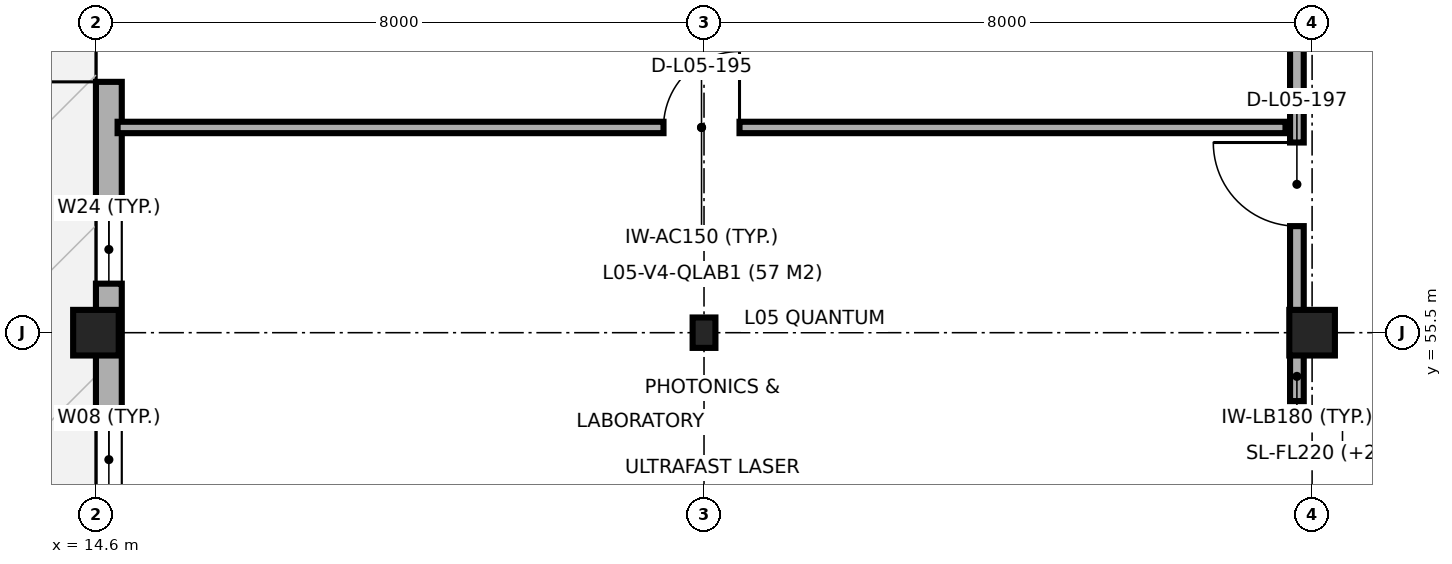
"""IFC4 building model, lengths in metres.
Left out: names, types, materials, properties, quantities, classifications, styles, units other than length and angle.
Written with IfcOpenShell. Run it as: python <this file> out.ifc"""

import sys

from ifc_helpers import new_model, si_unit, direction, frame, frame_2d, origin, origin_2d, place, context, subcontext, project, spatial, rectangle, i_section, extrude, element, fill, save


model = new_model("IFC4")
c1 = context("Model", 3, precision=1e-05, world=origin(), true_north=direction((0.0, 1.0)))
c2 = subcontext(c1, "Body", "Model", "MODEL_VIEW")
j1 = project(units=[si_unit("LENGTHUNIT", "METRE"), si_unit("PLANEANGLEUNIT", "RADIAN")], contexts=[c1])
p1 = place(None, origin())
s1 = spatial("IfcSite", under=j1, at=p1, CompositionType="ELEMENT")
p2 = place(p1, origin())
s2 = spatial("IfcBuilding", under=s1, at=p2, CompositionType="ELEMENT")
p3 = place(p2, frame((0.0, 0.0, 22.8)))
s3 = spatial("IfcBuildingStorey", under=s2, at=p3, CompositionType="ELEMENT", Elevation=22.8)
p4 = place(p3, frame((14.6, 55.5, 0.0), z_axis=(0.0, 0.0, 1.0), x_axis=(1.0, 0.0, 0.0)))
e1 = element("IfcColumn", 1, at=p4, inside=s3, PredefinedType="COLUMN", context=c2, shape_type="SweptSolid", body=[
    extrude(rectangle(XDim=0.6, YDim=0.6, at=origin_2d()), origin(), (0.0, 0.0, 1.0), 3.9),
])
p5 = place(p3, frame((22.6, 55.5, 0.0), z_axis=(0.0, 0.0, 1.0), x_axis=(1.0, 0.0, 0.0)))
e2 = element("IfcColumn", 2, at=p5, inside=s3, PredefinedType="COLUMN", context=c2, shape_type="SweptSolid", body=[
    extrude(i_section(OverallWidth=0.3, OverallDepth=0.4, WebThickness=0.013, FlangeThickness=0.024, FilletRadius=0.027, at=origin_2d()), origin(), (0.0, 0.0, 1.0), 3.9),
])
p6 = place(p3, frame((30.6, 55.5, 0.0), z_axis=(0.0, 0.0, 1.0), x_axis=(1.0, 0.0, 0.0)))
e3 = element("IfcColumn", 3, at=p6, inside=s3, PredefinedType="COLUMN", context=c2, shape_type="SweptSolid", body=[
    extrude(rectangle(XDim=0.6, YDim=0.6, at=origin_2d()), origin(), (0.0, 0.0, 1.0), 3.9),
])
p7 = place(p3, frame((14.77, 71.178, 0.0), z_axis=(0.0, 0.0, 1.0), x_axis=(0.0, -1.0, 0.0)))
e4 = element("IfcWall", 4, at=p7, inside=s3, PredefinedType="SOLIDWALL", context=c2, shape_type="SweptSolid", body=[
    extrude(rectangle(XDim=24.278, YDim=0.34, at=frame_2d((12.139, 0.0))), origin(), (0.0, 0.0, 1.0), 3.68),
])
p8 = place(p7, frame((10.978, 0.0, 0.0)))
e5 = element("IfcOpeningElement", 5, at=p8, cuts=e4, PredefinedType="OPENING", context=c2, shape_type="SweptSolid", body=[
    extrude(rectangle(XDim=1.4, YDim=2.2, at=frame_2d((0.7, 1.1))), frame((0.0, 0.18, 0.0), z_axis=(0.0, -1.0, 0.0), x_axis=(1.0, 0.0, 0.0)), (0.0, 0.0, 1.0), 0.36),
])
p9 = place(p7, frame((2.334, 0.0, 0.9)))
e6 = element("IfcOpeningElement", 6, at=p9, cuts=e4, PredefinedType="OPENING", context=c2, shape_type="SweptSolid", body=[
    extrude(rectangle(XDim=1.5, YDim=1.8, at=frame_2d((0.75, 0.9))), frame((0.0, 0.18, 0.0), z_axis=(0.0, -1.0, 0.0), x_axis=(1.0, 0.0, 0.0)), (0.0, 0.0, 1.0), 0.36),
])
p10 = place(p7, frame((8.298, 0.0, 0.9)))
e7 = element("IfcOpeningElement", 7, at=p10, cuts=e4, PredefinedType="OPENING", context=c2, shape_type="SweptSolid", body=[
    extrude(rectangle(XDim=0.9, YDim=1.8, at=frame_2d((0.45, 0.9))), frame((0.0, 0.18, 0.0), z_axis=(0.0, -1.0, 0.0), x_axis=(1.0, 0.0, 0.0)), (0.0, 0.0, 1.0), 0.36),
])
p11 = place(p7, frame((14.133, 0.0, 0.9)))
e8 = element("IfcOpeningElement", 8, at=p11, cuts=e4, PredefinedType="OPENING", context=c2, shape_type="SweptSolid", body=[
    extrude(rectangle(XDim=0.9, YDim=1.8, at=frame_2d((0.45, 0.9))), frame((0.0, 0.18, 0.0), z_axis=(0.0, -1.0, 0.0), x_axis=(1.0, 0.0, 0.0)), (0.0, 0.0, 1.0), 0.36),
])
p12 = place(p7, frame((16.748, 0.0, 0.9)))
e9 = element("IfcOpeningElement", 9, at=p12, cuts=e4, PredefinedType="OPENING", context=c2, shape_type="SweptSolid", body=[
    extrude(rectangle(XDim=1.2, YDim=2.1, at=frame_2d((0.6, 1.05))), frame((0.0, 0.18, 0.0), z_axis=(0.0, -1.0, 0.0), x_axis=(1.0, 0.0, 0.0)), (0.0, 0.0, 1.0), 0.36),
])
p13 = place(p7, frame((20.198, 0.0, 0.9)))
e10 = element("IfcOpeningElement", 10, at=p13, cuts=e4, PredefinedType="OPENING", context=c2, shape_type="SweptSolid", body=[
    extrude(rectangle(XDim=1.8, YDim=2.1, at=frame_2d((0.9, 1.05))), frame((0.0, 0.18, 0.0), z_axis=(0.0, -1.0, 0.0), x_axis=(1.0, 0.0, 0.0)), (0.0, 0.0, 1.0), 0.36),
])
p14 = place(p3, frame((14.885, 58.2, 0.0), z_axis=(0.0, 0.0, 1.0), x_axis=(1.0, 0.0, 0.0)))
e11 = element("IfcWall", 11, at=p14, inside=s3, PredefinedType="PARTITIONING", context=c2, shape_type="SweptSolid", body=[
    extrude(rectangle(XDim=15.365, YDim=0.15, at=frame_2d((7.683, 0.0))), origin(), (0.0, 0.0, 1.0), 3.68),
])
p15 = place(p14, frame((7.182, 0.0, 0.0)))
e12 = element("IfcOpeningElement", 12, at=p15, cuts=e11, PredefinedType="OPENING", context=c2, shape_type="SweptSolid", body=[
    extrude(rectangle(XDim=1.0, YDim=2.15, at=frame_2d((0.5, 1.075))), frame((0.0, 0.085, 0.0), z_axis=(0.0, -1.0, 0.0), x_axis=(1.0, 0.0, 0.0)), (0.0, 0.0, 1.0), 0.17),
])
p16 = place(p3, frame((30.4, 54.6, 0.0), z_axis=(0.0, 0.0, 1.0), x_axis=(0.0, 1.0, 0.0)))
e13 = element("IfcWall", 13, at=p16, inside=s3, PredefinedType="PARTITIONING", context=c2, shape_type="SweptSolid", body=[
    extrude(rectangle(XDim=0.65, YDim=0.18, at=frame_2d((0.325, 0.0))), origin(), (0.0, 0.0, 1.0), 3.28),
])
p17 = place(p3, frame((30.4, 55.75, 0.0), z_axis=(0.0, 0.0, 1.0), x_axis=(0.0, 1.0, 0.0)))
e14 = element("IfcWall", 14, at=p17, inside=s3, PredefinedType="PARTITIONING", context=c2, shape_type="SweptSolid", body=[
    extrude(rectangle(XDim=7.5, YDim=0.18, at=frame_2d((3.75, 0.0))), origin(), (0.0, 0.0, 1.0), 3.28),
])
p18 = place(p17, frame((1.152, 0.0, 0.0)))
e15 = element("IfcOpeningElement", 15, at=p18, cuts=e14, PredefinedType="OPENING", context=c2, shape_type="SweptSolid", body=[
    extrude(rectangle(XDim=1.1, YDim=2.15, at=frame_2d((0.55, 1.075))), frame((0.0, 0.1, 0.0), z_axis=(0.0, -1.0, 0.0), x_axis=(1.0, 0.0, 0.0)), (0.0, 0.0, 1.0), 0.2),
])
p19 = place(p8, frame((1.4, 0.0, 0.0), z_axis=(0.0, 0.0, 1.0), x_axis=(-1.0, 0.0, 0.0)))
e16 = element("IfcDoor", 16, at=p19, inside=s3, OperationType="SINGLE_SWING_RIGHT", PredefinedType="DOOR", context=c2, shape_type="SweptSolid", body=[
    extrude(rectangle(XDim=1.4, YDim=2.2, at=frame_2d((0.7, 1.1))), frame((0.0, 0.025, 0.0), z_axis=(0.0, -1.0, 0.0), x_axis=(1.0, 0.0, 0.0)), (0.0, 0.0, 1.0), 0.05),
])
fill(e5, e16)
p20 = place(p11, origin())
e17 = element("IfcWindow", 17, at=p20, inside=s3, PartitioningType="SINGLE_PANEL", PredefinedType="WINDOW", context=c2, shape_type="SweptSolid", body=[
    extrude(rectangle(XDim=0.9, YDim=1.8, at=frame_2d((0.45, 0.9))), frame((0.0, 0.03, 0.0), z_axis=(0.0, -1.0, 0.0), x_axis=(1.0, 0.0, 0.0)), (0.0, 0.0, 1.0), 0.06),
])
fill(e8, e17)
p21 = place(p12, origin())
e18 = element("IfcWindow", 18, at=p21, inside=s3, PartitioningType="SINGLE_PANEL", PredefinedType="WINDOW", context=c2, shape_type="SweptSolid", body=[
    extrude(rectangle(XDim=1.2, YDim=2.1, at=frame_2d((0.6, 1.05))), frame((0.0, 0.03, 0.0), z_axis=(0.0, -1.0, 0.0), x_axis=(1.0, 0.0, 0.0)), (0.0, 0.0, 1.0), 0.06),
])
fill(e9, e18)
p22 = place(p15, origin())
e19 = element("IfcDoor", 19, at=p22, inside=s3, OperationType="SINGLE_SWING_RIGHT", PredefinedType="DOOR", context=c2, shape_type="SweptSolid", body=[
    extrude(rectangle(XDim=1.0, YDim=2.15, at=frame_2d((0.5, 1.075))), frame((0.0, 0.025, 0.0), z_axis=(0.0, -1.0, 0.0), x_axis=(1.0, 0.0, 0.0)), (0.0, 0.0, 1.0), 0.05),
])
fill(e12, e19)
p23 = place(p18, origin())
e20 = element("IfcDoor", 20, at=p23, inside=s3, OperationType="SINGLE_SWING_RIGHT", PredefinedType="DOOR", context=c2, shape_type="SweptSolid", body=[
    extrude(rectangle(XDim=1.1, YDim=2.15, at=frame_2d((0.55, 1.075))), frame((0.0, 0.025, 0.0), z_axis=(0.0, -1.0, 0.0), x_axis=(1.0, 0.0, 0.0)), (0.0, 0.0, 1.0), 0.05),
])
fill(e15, e20)
save(model, sys.argv[1])
